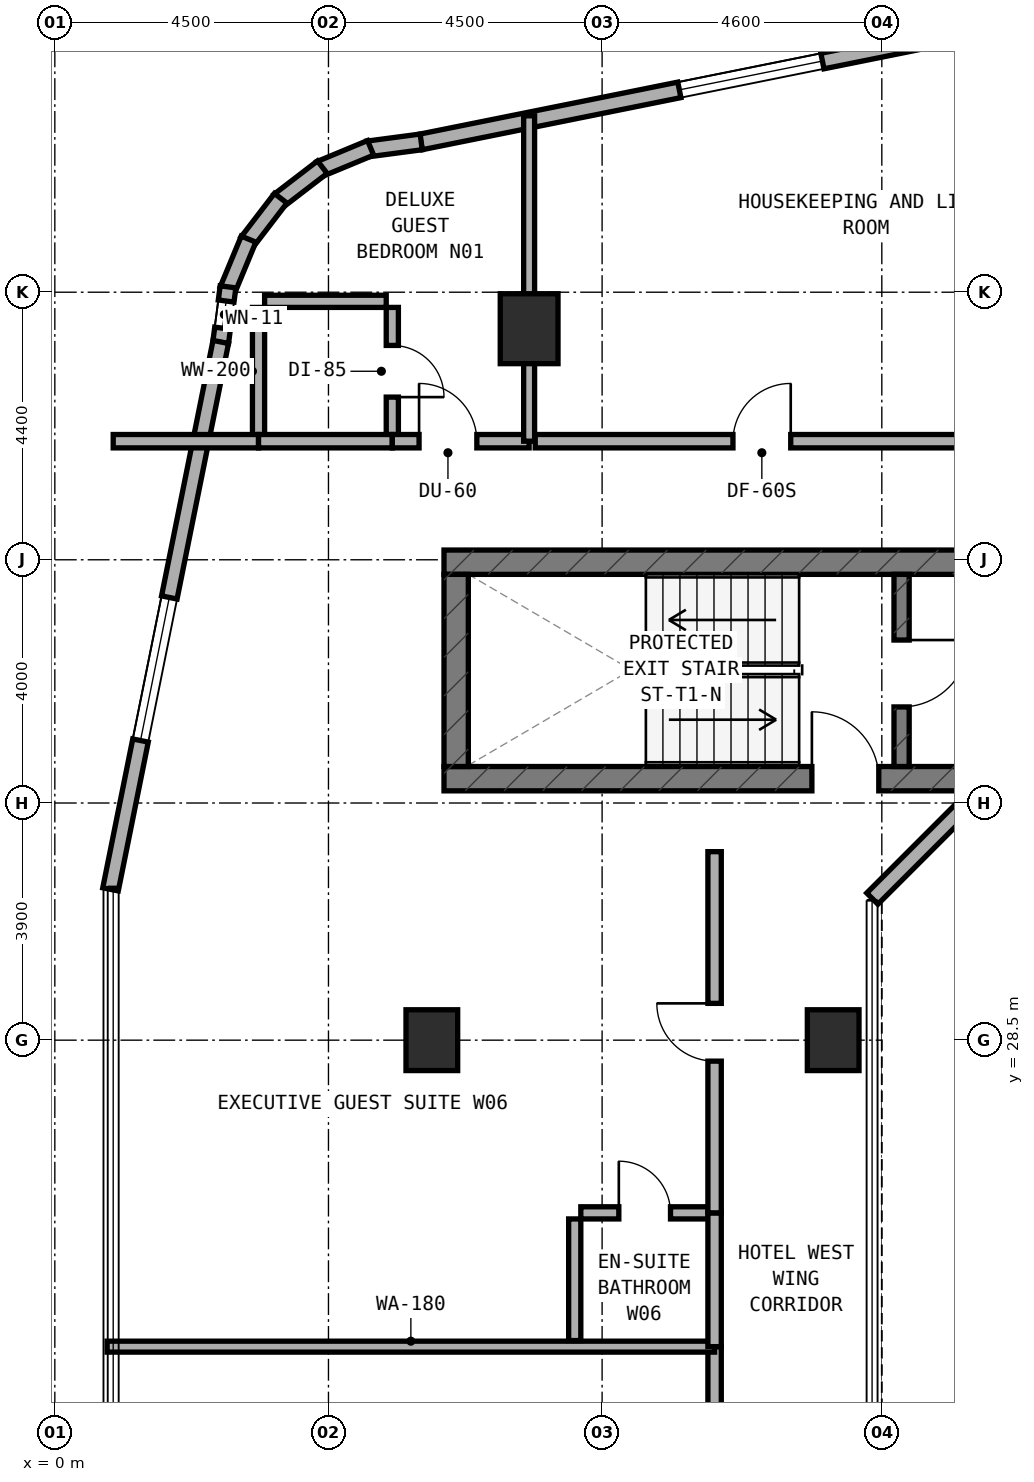
"""IFC4 building model, lengths in metres.
Left out: names, types, materials, properties, quantities, classifications, styles, units other than length and angle.
Written with IfcOpenShell. Run it as: python <this file> out.ifc"""

import sys

from ifc_helpers import new_model, si_unit, direction, frame, frame_2d, origin, origin_2d, place, context, subcontext, project, spatial, rectangle, extrude, element, fill, save


model = new_model("IFC4")
c1 = context("Model", 3, precision=1e-05, world=origin(), true_north=direction((0.0, 1.0)))
c2 = subcontext(c1, "Body", "Model", "MODEL_VIEW")
j1 = project(units=[si_unit("LENGTHUNIT", "METRE"), si_unit("PLANEANGLEUNIT", "RADIAN")], contexts=[c1])
p1 = place(None, origin())
s1 = spatial("IfcSite", under=j1, at=p1, CompositionType="ELEMENT")
p2 = place(p1, origin())
s2 = spatial("IfcBuilding", under=s1, at=p2, CompositionType="ELEMENT")
p3 = place(p2, frame((0.0, 0.0, 109.0)))
s3 = spatial("IfcBuildingStorey", under=s2, at=p3, CompositionType="ELEMENT", Elevation=109.0)
p4 = place(p3, frame((6.4, 32.8, 0.0), z_axis=(0.0, 0.0, 1.0), x_axis=(1.0, 0.0, 0.0)))
e1 = element("IfcWall", 1, at=p4, inside=s3, PredefinedType="SHEAR", context=c2, shape_type="SweptSolid", body=[
    extrude(rectangle(XDim=24.4, YDim=0.4, at=frame_2d((12.2, 0.0))), origin(), (0.0, 0.0, 1.0), 3.5),
])
p5 = place(p4, frame((6.05, 0.0, 0.0)))
e2 = element("IfcOpeningElement", 2, at=p5, cuts=e1, PredefinedType="OPENING", context=c2, shape_type="SweptSolid", body=[
    extrude(rectangle(XDim=1.1, YDim=2.15, at=frame_2d((0.55, 1.075))), frame((0.0, 0.21, 0.0), z_axis=(0.0, -1.0, 0.0), x_axis=(1.0, 0.0, 0.0)), (0.0, 0.0, 1.0), 0.42),
])
p6 = place(p3, frame((6.4, 36.36, 0.0), z_axis=(0.0, 0.0, 1.0), x_axis=(1.0, 0.0, 0.0)))
e3 = element("IfcWall", 3, at=p6, inside=s3, PredefinedType="SHEAR", context=c2, shape_type="SweptSolid", body=[
    extrude(rectangle(XDim=24.4, YDim=0.4, at=frame_2d((12.2, 0.0))), origin(), (0.0, 0.0, 1.0), 3.5),
])
p7 = place(p6, frame((9.15, 0.0, 0.0)))
e4 = element("IfcOpeningElement", 4, at=p7, cuts=e3, PredefinedType="OPENING", context=c2, shape_type="SweptSolid", body=[
    extrude(rectangle(XDim=1.2, YDim=2.15, at=frame_2d((0.6, 1.075))), frame((0.0, 0.21, 0.0), z_axis=(0.0, -1.0, 0.0), x_axis=(1.0, 0.0, 0.0)), (0.0, 0.0, 1.0), 0.42),
])
p8 = place(p6, frame((16.94, 0.0, 0.0)))
e5 = element("IfcOpeningElement", 5, at=p8, cuts=e3, PredefinedType="OPENING", context=c2, shape_type="SweptSolid", body=[
    extrude(rectangle(XDim=0.85, YDim=2.1, at=frame_2d((0.425, 1.05))), frame((0.0, 0.21, 0.0), z_axis=(0.0, -1.0, 0.0), x_axis=(1.0, 0.0, 0.0)), (0.0, 0.0, 1.0), 0.42),
])
p9 = place(p6, frame((18.783, 0.0, 0.0)))
e6 = element("IfcOpeningElement", 6, at=p9, cuts=e3, PredefinedType="OPENING", context=c2, shape_type="SweptSolid", body=[
    extrude(rectangle(XDim=1.1, YDim=2.15, at=frame_2d((0.55, 1.075))), frame((0.0, 0.21, 0.0), z_axis=(0.0, -1.0, 0.0), x_axis=(1.0, 0.0, 0.0)), (0.0, 0.0, 1.0), 0.42),
])
p10 = place(p6, frame((20.65, 0.0, 0.0)))
e7 = element("IfcOpeningElement", 7, at=p10, cuts=e3, PredefinedType="OPENING", context=c2, shape_type="SweptSolid", body=[
    extrude(rectangle(XDim=1.1, YDim=2.15, at=frame_2d((0.55, 1.075))), frame((0.0, 0.21, 0.0), z_axis=(0.0, -1.0, 0.0), x_axis=(1.0, 0.0, 0.0)), (0.0, 0.0, 1.0), 0.42),
])
p11 = place(p6, frame((22.517, 0.0, 0.0)))
e8 = element("IfcOpeningElement", 8, at=p11, cuts=e3, PredefinedType="OPENING", context=c2, shape_type="SweptSolid", body=[
    extrude(rectangle(XDim=1.1, YDim=2.15, at=frame_2d((0.55, 1.075))), frame((0.0, 0.21, 0.0), z_axis=(0.0, -1.0, 0.0), x_axis=(1.0, 0.0, 0.0)), (0.0, 0.0, 1.0), 0.42),
])
p12 = place(p3, frame((6.6, 33.0, 0.0), z_axis=(0.0, 0.0, 1.0), x_axis=(0.0, 1.0, 0.0)))
e9 = element("IfcWall", 9, at=p12, inside=s3, PredefinedType="SHEAR", context=c2, shape_type="SweptSolid", body=[
    extrude(rectangle(XDim=3.16, YDim=0.4, at=frame_2d((1.58, 0.0))), origin(), (0.0, 0.0, 1.0), 3.5),
])
p13 = place(p3, frame((13.925, 33.0, 0.0), z_axis=(0.0, 0.0, 1.0), x_axis=(0.0, 1.0, 0.0)))
e10 = element("IfcWall", 10, at=p13, inside=s3, PredefinedType="STANDARD", context=c2, shape_type="SweptSolid", body=[
    extrude(rectangle(XDim=3.16, YDim=0.25, at=frame_2d((1.58, 0.0))), origin(), (0.0, 0.0, 1.0), 3.22),
])
p14 = place(p13, frame((0.98, 0.0, 0.0)))
e11 = element("IfcOpeningElement", 11, at=p14, cuts=e10, PredefinedType="OPENING", context=c2, shape_type="SweptSolid", body=[
    extrude(rectangle(XDim=1.1, YDim=2.15, at=frame_2d((0.55, 1.075))), frame((0.0, 0.135, 0.0), z_axis=(0.0, -1.0, 0.0), x_axis=(1.0, 0.0, 0.0)), (0.0, 0.0, 1.0), 0.27),
])
p15 = place(p3, frame((6.2, 28.5, 0.0), z_axis=(0.0, 0.0, 1.0), x_axis=(1.0, 0.0, 0.0)))
e12 = element("IfcColumn", 12, at=p15, inside=s3, PredefinedType="COLUMN", context=c2, shape_type="SweptSolid", body=[
    extrude(rectangle(XDim=0.85, YDim=1.0, at=origin_2d()), origin(), (0.0, 0.0, 1.0), 3.5),
])
p16 = place(p3, frame((7.8, 40.2, 0.0), z_axis=(0.0, 0.0, 1.0), x_axis=(1.0, 0.0, 0.0)))
e13 = element("IfcColumn", 13, at=p16, inside=s3, PredefinedType="COLUMN", context=c2, shape_type="SweptSolid", body=[
    extrude(rectangle(XDim=0.95, YDim=1.15, at=origin_2d()), origin(), (0.0, 0.0, 1.0), 3.5),
])
p17 = place(p3, frame((12.8, 28.5, 0.0), z_axis=(0.0, 0.0, 1.0), x_axis=(1.0, 0.0, 0.0)))
e14 = element("IfcColumn", 14, at=p17, inside=s3, PredefinedType="COLUMN", context=c2, shape_type="SweptSolid", body=[
    extrude(rectangle(XDim=0.85, YDim=1.0, at=origin_2d()), origin(), (0.0, 0.0, 1.0), 3.5),
])
p18 = place(p3, frame((15.02, 45.084, 0.0), z_axis=(0.0, 0.0, 1.0), x_axis=(-0.980315963543, -0.197435082048, 0.0)))
e15 = element("IfcWall", 15, at=p18, inside=s3, PredefinedType="STANDARD", context=c2, shape_type="SweptSolid", body=[
    extrude(rectangle(XDim=9.183, YDim=0.26, at=frame_2d((4.591, 0.0))), origin(), (0.0, 0.0, 1.0), 3.22),
])
p19 = place(p18, frame((2.445, 0.0, 0.8)))
e16 = element("IfcOpeningElement", 16, at=p19, cuts=e15, PredefinedType="OPENING", context=c2, shape_type="SweptSolid", body=[
    extrude(rectangle(XDim=2.4, YDim=1.6, at=frame_2d((1.2, 0.8))), frame((0.0, 0.14, 0.0), z_axis=(0.0, -1.0, 0.0), x_axis=(1.0, 0.0, 0.0)), (0.0, 0.0, 1.0), 0.28),
])
p20 = place(p3, frame((6.025, 43.272, 0.0), z_axis=(0.0, 0.0, 1.0), x_axis=(-0.991388484223, -0.130953706898, 0.0)))
e17 = element("IfcWall", 17, at=p20, inside=s3, PredefinedType="STANDARD", context=c2, shape_type="SweptSolid", body=[
    extrude(rectangle(XDim=0.885, YDim=0.26, at=frame_2d((0.443, 0.0))), origin(), (0.0, 0.0, 1.0), 3.22),
])
p21 = place(p3, frame((5.193, 43.174, 0.0), z_axis=(0.0, 0.0, 1.0), x_axis=(-0.923627776508, -0.383290660547, 0.0)))
e18 = element("IfcWall", 18, at=p21, inside=s3, PredefinedType="STANDARD", context=c2, shape_type="SweptSolid", body=[
    extrude(rectangle(XDim=0.903, YDim=0.26, at=frame_2d((0.452, 0.0))), origin(), (0.0, 0.0, 1.0), 3.22),
])
p22 = place(p3, frame((4.399, 42.856, 0.0), z_axis=(0.0, 0.0, 1.0), x_axis=(-0.793458244748, -0.608624690463, 0.0)))
e19 = element("IfcWall", 19, at=p22, inside=s3, PredefinedType="STANDARD", context=c2, shape_type="SweptSolid", body=[
    extrude(rectangle(XDim=0.902, YDim=0.26, at=frame_2d((0.451, 0.0))), origin(), (0.0, 0.0, 1.0), 3.22),
])
p23 = place(p3, frame((3.714, 42.345, 0.0), z_axis=(0.0, 0.0, 1.0), x_axis=(-0.608494022858, -0.793558456666, 0.0)))
e20 = element("IfcWall", 20, at=p23, inside=s3, PredefinedType="STANDARD", context=c2, shape_type="SweptSolid", body=[
    extrude(rectangle(XDim=0.902, YDim=0.26, at=frame_2d((0.451, 0.0))), origin(), (0.0, 0.0, 1.0), 3.22),
])
p24 = place(p3, frame((3.186, 41.673, 0.0), z_axis=(0.0, 0.0, 1.0), x_axis=(-0.383155708213, -0.923683767999, 0.0)))
e21 = element("IfcWall", 21, at=p24, inside=s3, PredefinedType="STANDARD", context=c2, shape_type="SweptSolid", body=[
    extrude(rectangle(XDim=0.903, YDim=0.26, at=frame_2d((0.451, 0.0))), origin(), (0.0, 0.0, 1.0), 3.22),
])
p25 = place(p3, frame((2.848, 40.888, 0.0), z_axis=(0.0, 0.0, 1.0), x_axis=(-0.130200706103, -0.991487658083, 0.0)))
e22 = element("IfcWall", 22, at=p25, inside=s3, PredefinedType="STANDARD", context=c2, shape_type="SweptSolid", body=[
    extrude(rectangle(XDim=0.921, YDim=0.26, at=frame_2d((0.46, 0.0))), origin(), (0.0, 0.0, 1.0), 3.22),
])
p26 = place(p25, frame((0.235, 0.0, 0.85)))
e23 = element("IfcOpeningElement", 23, at=p26, cuts=e22, PredefinedType="OPENING", context=c2, shape_type="SweptSolid", body=[
    extrude(rectangle(XDim=0.45, YDim=1.5, at=frame_2d((0.225, 0.75))), frame((0.0, 0.14, 0.0), z_axis=(0.0, -1.0, 0.0), x_axis=(1.0, 0.0, 0.0)), (0.0, 0.0, 1.0), 0.28),
])
p27 = place(p3, frame((2.729, 39.982, 0.0), z_axis=(0.0, 0.0, 1.0), x_axis=(-0.197435082048, -0.980315963543, 0.0)))
e24 = element("IfcWall", 24, at=p27, inside=s3, PredefinedType="STANDARD", context=c2, shape_type="SweptSolid", body=[
    extrude(rectangle(XDim=9.183, YDim=0.26, at=frame_2d((4.591, 0.0))), origin(), (0.0, 0.0, 1.0), 3.22),
])
p28 = place(p27, frame((4.286, 0.0, 0.8)))
e25 = element("IfcOpeningElement", 25, at=p28, cuts=e24, PredefinedType="OPENING", context=c2, shape_type="SweptSolid", body=[
    extrude(rectangle(XDim=2.4, YDim=1.6, at=frame_2d((1.2, 0.8))), frame((0.0, 0.14, 0.0), z_axis=(0.0, -1.0, 0.0), x_axis=(1.0, 0.0, 0.0)), (0.0, 0.0, 1.0), 0.28),
])
p29 = place(p3, frame((15.278, 32.662, 0.0), z_axis=(0.0, 0.0, 1.0), x_axis=(-0.707059717605, -0.707153841636, 0.0)))
e26 = element("IfcWall", 26, at=p29, inside=s3, PredefinedType="STANDARD", context=c2, shape_type="SweptSolid", body=[
    extrude(rectangle(XDim=2.594, YDim=0.26, at=frame_2d((1.297, 0.0))), origin(), (0.0, 0.0, 1.0), 3.22),
])
p30 = place(p3, frame((5.55, 38.45, 0.0), z_axis=(0.0, 0.0, 1.0), x_axis=(0.0, 1.0, 0.0)))
e27 = element("IfcWall", 27, at=p30, inside=s3, PredefinedType="PLUMBINGWALL", context=c2, shape_type="SweptSolid", body=[
    extrude(rectangle(XDim=2.1, YDim=0.2, at=frame_2d((1.05, 0.0))), origin(), (0.0, 0.0, 1.0), 3.22),
])
p31 = place(p30, frame((0.625, 0.0, 0.0)))
e28 = element("IfcOpeningElement", 28, at=p31, cuts=e27, PredefinedType="OPENING", context=c2, shape_type="SweptSolid", body=[
    extrude(rectangle(XDim=0.85, YDim=2.1, at=frame_2d((0.425, 1.05))), frame((0.0, 0.11, 0.0), z_axis=(0.0, -1.0, 0.0), x_axis=(1.0, 0.0, 0.0)), (0.0, 0.0, 1.0), 0.22),
])
p32 = place(p3, frame((3.45, 40.65, 0.0), z_axis=(0.0, 0.0, 1.0), x_axis=(1.0, 0.0, 0.0)))
e29 = element("IfcWall", 29, at=p32, inside=s3, PredefinedType="PLUMBINGWALL", context=c2, shape_type="SweptSolid", body=[
    extrude(rectangle(XDim=2.0, YDim=0.2, at=frame_2d((1.0, 0.0))), origin(), (0.0, 0.0, 1.0), 3.22),
])
p33 = place(p3, frame((3.35, 38.45, 0.0), z_axis=(0.0, 0.0, 1.0), x_axis=(0.0, 1.0, 0.0)))
e30 = element("IfcWall", 30, at=p33, inside=s3, PredefinedType="PLUMBINGWALL", context=c2, shape_type="SweptSolid", body=[
    extrude(rectangle(XDim=2.1, YDim=0.2, at=frame_2d((1.05, 0.0))), origin(), (0.0, 0.0, 1.0), 3.22),
])
p34 = place(p3, frame((0.96, 38.35, 0.0), z_axis=(0.0, 0.0, 1.0), x_axis=(1.0, 0.0, 0.0)))
e31 = element("IfcWall", 31, at=p34, inside=s3, PredefinedType="SOLIDWALL", context=c2, shape_type="SweptSolid", body=[
    extrude(rectangle(XDim=2.39, YDim=0.22, at=frame_2d((1.195, 0.0))), origin(), (0.0, 0.0, 1.0), 3.22),
])
p35 = place(p3, frame((3.35, 38.35, 0.0), z_axis=(0.0, 0.0, 1.0), x_axis=(1.0, 0.0, 0.0)))
e32 = element("IfcWall", 32, at=p35, inside=s3, PredefinedType="SOLIDWALL", context=c2, shape_type="SweptSolid", body=[
    extrude(rectangle(XDim=2.2, YDim=0.22, at=frame_2d((1.1, 0.0))), origin(), (0.0, 0.0, 1.0), 3.22),
])
p36 = place(p3, frame((5.55, 38.35, 0.0), z_axis=(0.0, 0.0, 1.0), x_axis=(1.0, 0.0, 0.0)))
e33 = element("IfcWall", 33, at=p36, inside=s3, PredefinedType="SOLIDWALL", context=c2, shape_type="SweptSolid", body=[
    extrude(rectangle(XDim=2.25, YDim=0.22, at=frame_2d((1.125, 0.0))), origin(), (0.0, 0.0, 1.0), 2.595),
])
p37 = place(p36, frame((0.44, 0.0, 0.0)))
e34 = element("IfcOpeningElement", 34, at=p37, cuts=e33, PredefinedType="OPENING", context=c2, shape_type="SweptSolid", body=[
    extrude(rectangle(XDim=0.95, YDim=2.1, at=frame_2d((0.475, 1.05))), frame((0.0, 0.12, 0.0), z_axis=(0.0, -1.0, 0.0), x_axis=(1.0, 0.0, 0.0)), (0.0, 0.0, 1.0), 0.24),
])
p38 = place(p3, frame((7.8, 38.35, 0.0), z_axis=(0.0, 0.0, 1.0), x_axis=(0.0, 1.0, 0.0)))
e35 = element("IfcWall", 35, at=p38, inside=s3, PredefinedType="SOLIDWALL", context=c2, shape_type="SweptSolid", body=[
    extrude(rectangle(XDim=5.351, YDim=0.18, at=frame_2d((2.675, 0.0))), origin(), (0.0, 0.0, 1.0), 2.595),
])
p39 = place(p3, frame((7.9, 38.35, 0.0), z_axis=(0.0, 0.0, 1.0), x_axis=(1.0, 0.0, 0.0)))
e36 = element("IfcWall", 36, at=p39, inside=s3, PredefinedType="SOLIDWALL", context=c2, shape_type="SweptSolid", body=[
    extrude(rectangle(XDim=8.2, YDim=0.22, at=frame_2d((4.1, 0.0))), origin(), (0.0, 0.0, 1.0), 3.22),
])
p40 = place(p39, frame((3.252, 0.0, 0.0)))
e37 = element("IfcOpeningElement", 37, at=p40, cuts=e36, PredefinedType="OPENING", context=c2, shape_type="SweptSolid", body=[
    extrude(rectangle(XDim=0.95, YDim=2.1, at=frame_2d((0.475, 1.05))), frame((0.0, 0.12, 0.0), z_axis=(0.0, -1.0, 0.0), x_axis=(1.0, 0.0, 0.0)), (0.0, 0.0, 1.0), 0.24),
])
p41 = place(p3, frame((10.85, 20.6, 0.0), z_axis=(0.0, 0.0, 1.0), x_axis=(0.0, 1.0, 0.0)))
e38 = element("IfcWall", 38, at=p41, inside=s3, PredefinedType="SOLIDWALL", context=c2, shape_type="SweptSolid", body=[
    extrude(rectangle(XDim=2.86, YDim=0.22, at=frame_2d((1.43, 0.0))), origin(), (0.0, 0.0, 1.0), 2.595),
])
p42 = place(p41, frame((0.955, 0.0, 0.0)))
e39 = element("IfcOpeningElement", 39, at=p42, cuts=e38, PredefinedType="OPENING", context=c2, shape_type="SweptSolid", body=[
    extrude(rectangle(XDim=0.95, YDim=2.1, at=frame_2d((0.475, 1.05))), frame((0.0, 0.12, 0.0), z_axis=(0.0, -1.0, 0.0), x_axis=(1.0, 0.0, 0.0)), (0.0, 0.0, 1.0), 0.24),
])
p43 = place(p3, frame((0.86, 23.46, 0.0), z_axis=(0.0, 0.0, 1.0), x_axis=(1.0, 0.0, 0.0)))
e40 = element("IfcWall", 40, at=p43, inside=s3, PredefinedType="SOLIDWALL", context=c2, shape_type="SweptSolid", body=[
    extrude(rectangle(XDim=9.99, YDim=0.18, at=frame_2d((4.995, 0.0))), origin(), (0.0, 0.0, 1.0), 2.835),
])
p44 = place(p3, frame((8.65, 25.66, 0.0), z_axis=(0.0, 0.0, 1.0), x_axis=(1.0, 0.0, 0.0)))
e41 = element("IfcWall", 41, at=p44, inside=s3, PredefinedType="PLUMBINGWALL", context=c2, shape_type="SweptSolid", body=[
    extrude(rectangle(XDim=2.1, YDim=0.2, at=frame_2d((1.05, 0.0))), origin(), (0.0, 0.0, 1.0), 3.22),
])
p45 = place(p44, frame((0.625, 0.0, 0.0)))
e42 = element("IfcOpeningElement", 42, at=p45, cuts=e41, PredefinedType="OPENING", context=c2, shape_type="SweptSolid", body=[
    extrude(rectangle(XDim=0.85, YDim=2.1, at=frame_2d((0.425, 1.05))), frame((0.0, 0.11, 0.0), z_axis=(0.0, -1.0, 0.0), x_axis=(1.0, 0.0, 0.0)), (0.0, 0.0, 1.0), 0.22),
])
p46 = place(p3, frame((8.55, 23.56, 0.0), z_axis=(0.0, 0.0, 1.0), x_axis=(0.0, 1.0, 0.0)))
e43 = element("IfcWall", 43, at=p46, inside=s3, PredefinedType="PLUMBINGWALL", context=c2, shape_type="SweptSolid", body=[
    extrude(rectangle(XDim=2.0, YDim=0.2, at=frame_2d((1.0, 0.0))), origin(), (0.0, 0.0, 1.0), 3.22),
])
p47 = place(p3, frame((10.85, 23.46, 0.0), z_axis=(0.0, 0.0, 1.0), x_axis=(0.0, 1.0, 0.0)))
e44 = element("IfcWall", 44, at=p47, inside=s3, PredefinedType="SOLIDWALL", context=c2, shape_type="SweptSolid", body=[
    extrude(rectangle(XDim=2.2, YDim=0.22, at=frame_2d((1.1, 0.0))), origin(), (0.0, 0.0, 1.0), 3.22),
])
p48 = place(p3, frame((10.85, 25.66, 0.0), z_axis=(0.0, 0.0, 1.0), x_axis=(0.0, 1.0, 0.0)))
e45 = element("IfcWall", 45, at=p48, inside=s3, PredefinedType="SOLIDWALL", context=c2, shape_type="SweptSolid", body=[
    extrude(rectangle(XDim=5.94, YDim=0.22, at=frame_2d((2.97, 0.0))), origin(), (0.0, 0.0, 1.0), 2.595),
])
p49 = place(p48, frame((2.495, 0.0, 0.0)))
e46 = element("IfcOpeningElement", 46, at=p49, cuts=e45, PredefinedType="OPENING", context=c2, shape_type="SweptSolid", body=[
    extrude(rectangle(XDim=0.95, YDim=2.1, at=frame_2d((0.475, 1.05))), frame((0.0, 0.12, 0.0), z_axis=(0.0, -1.0, 0.0), x_axis=(1.0, 0.0, 0.0)), (0.0, 0.0, 1.0), 0.24),
])
p50 = place(p19, origin())
e47 = element("IfcWindow", 47, at=p50, inside=s3, PartitioningType="SINGLE_PANEL", PredefinedType="WINDOW", context=c2, shape_type="SweptSolid", body=[
    extrude(rectangle(XDim=2.4, YDim=1.6, at=frame_2d((1.2, 0.8))), frame((0.0, 0.03, 0.0), z_axis=(0.0, -1.0, 0.0), x_axis=(1.0, 0.0, 0.0)), (0.0, 0.0, 1.0), 0.06),
])
fill(e16, e47)
p51 = place(p28, origin())
e48 = element("IfcWindow", 48, at=p51, inside=s3, PartitioningType="SINGLE_PANEL", PredefinedType="WINDOW", context=c2, shape_type="SweptSolid", body=[
    extrude(rectangle(XDim=2.4, YDim=1.6, at=frame_2d((1.2, 0.8))), frame((0.0, 0.03, 0.0), z_axis=(0.0, -1.0, 0.0), x_axis=(1.0, 0.0, 0.0)), (0.0, 0.0, 1.0), 0.06),
])
fill(e25, e48)
p52 = place(p26, origin())
e49 = element("IfcWindow", 49, at=p52, inside=s3, PartitioningType="SINGLE_PANEL", PredefinedType="WINDOW", context=c2, shape_type="SweptSolid", body=[
    extrude(rectangle(XDim=0.45, YDim=1.5, at=frame_2d((0.225, 0.75))), frame((0.0, 0.03, 0.0), z_axis=(0.0, -1.0, 0.0), x_axis=(1.0, 0.0, 0.0)), (0.0, 0.0, 1.0), 0.06),
])
fill(e23, e49)
p53 = place(p14, frame((1.1, 0.0, 0.0), z_axis=(0.0, 0.0, 1.0), x_axis=(-1.0, 0.0, 0.0)))
e50 = element("IfcDoor", 50, at=p53, inside=s3, OperationType="SINGLE_SWING_LEFT", PredefinedType="DOOR", context=c2, shape_type="SweptSolid", body=[
    extrude(rectangle(XDim=1.1, YDim=2.15, at=frame_2d((0.55, 1.075))), frame((0.0, 0.025, 0.0), z_axis=(0.0, -1.0, 0.0), x_axis=(1.0, 0.0, 0.0)), (0.0, 0.0, 1.0), 0.05),
])
fill(e11, e50)
p54 = place(p5, origin())
e51 = element("IfcDoor", 51, at=p54, inside=s3, OperationType="SINGLE_SWING_LEFT", PredefinedType="DOOR", context=c2, shape_type="SweptSolid", body=[
    extrude(rectangle(XDim=1.1, YDim=2.15, at=frame_2d((0.55, 1.075))), frame((0.0, 0.025, 0.0), z_axis=(0.0, -1.0, 0.0), x_axis=(1.0, 0.0, 0.0)), (0.0, 0.0, 1.0), 0.05),
])
fill(e2, e51)
p55 = place(p31, frame((0.85, 0.0, 0.0), z_axis=(0.0, 0.0, 1.0), x_axis=(-1.0, 0.0, 0.0)))
e52 = element("IfcDoor", 52, at=p55, inside=s3, OperationType="SINGLE_SWING_RIGHT", PredefinedType="DOOR", context=c2, shape_type="SweptSolid", body=[
    extrude(rectangle(XDim=0.85, YDim=2.1, at=frame_2d((0.425, 1.05))), frame((0.0, 0.025, 0.0), z_axis=(0.0, -1.0, 0.0), x_axis=(1.0, 0.0, 0.0)), (0.0, 0.0, 1.0), 0.05),
])
fill(e28, e52)
p56 = place(p37, origin())
e53 = element("IfcDoor", 53, at=p56, inside=s3, OperationType="SINGLE_SWING_LEFT", PredefinedType="DOOR", context=c2, shape_type="SweptSolid", body=[
    extrude(rectangle(XDim=0.95, YDim=2.1, at=frame_2d((0.475, 1.05))), frame((0.0, 0.025, 0.0), z_axis=(0.0, -1.0, 0.0), x_axis=(1.0, 0.0, 0.0)), (0.0, 0.0, 1.0), 0.05),
])
fill(e34, e53)
p57 = place(p40, origin())
e54 = element("IfcDoor", 54, at=p57, inside=s3, OperationType="SINGLE_SWING_RIGHT", PredefinedType="DOOR", context=c2, shape_type="SweptSolid", body=[
    extrude(rectangle(XDim=0.95, YDim=2.1, at=frame_2d((0.475, 1.05))), frame((0.0, 0.025, 0.0), z_axis=(0.0, -1.0, 0.0), x_axis=(1.0, 0.0, 0.0)), (0.0, 0.0, 1.0), 0.05),
])
fill(e37, e54)
p58 = place(p45, origin())
e55 = element("IfcDoor", 55, at=p58, inside=s3, OperationType="SINGLE_SWING_LEFT", PredefinedType="DOOR", context=c2, shape_type="SweptSolid", body=[
    extrude(rectangle(XDim=0.85, YDim=2.1, at=frame_2d((0.425, 1.05))), frame((0.0, 0.025, 0.0), z_axis=(0.0, -1.0, 0.0), x_axis=(1.0, 0.0, 0.0)), (0.0, 0.0, 1.0), 0.05),
])
fill(e42, e55)
p59 = place(p49, origin())
e56 = element("IfcDoor", 56, at=p59, inside=s3, OperationType="SINGLE_SWING_RIGHT", PredefinedType="DOOR", context=c2, shape_type="SweptSolid", body=[
    extrude(rectangle(XDim=0.95, YDim=2.1, at=frame_2d((0.475, 1.05))), frame((0.0, 0.025, 0.0), z_axis=(0.0, -1.0, 0.0), x_axis=(1.0, 0.0, 0.0)), (0.0, 0.0, 1.0), 0.05),
])
fill(e46, e56)
save(model, sys.argv[1])
